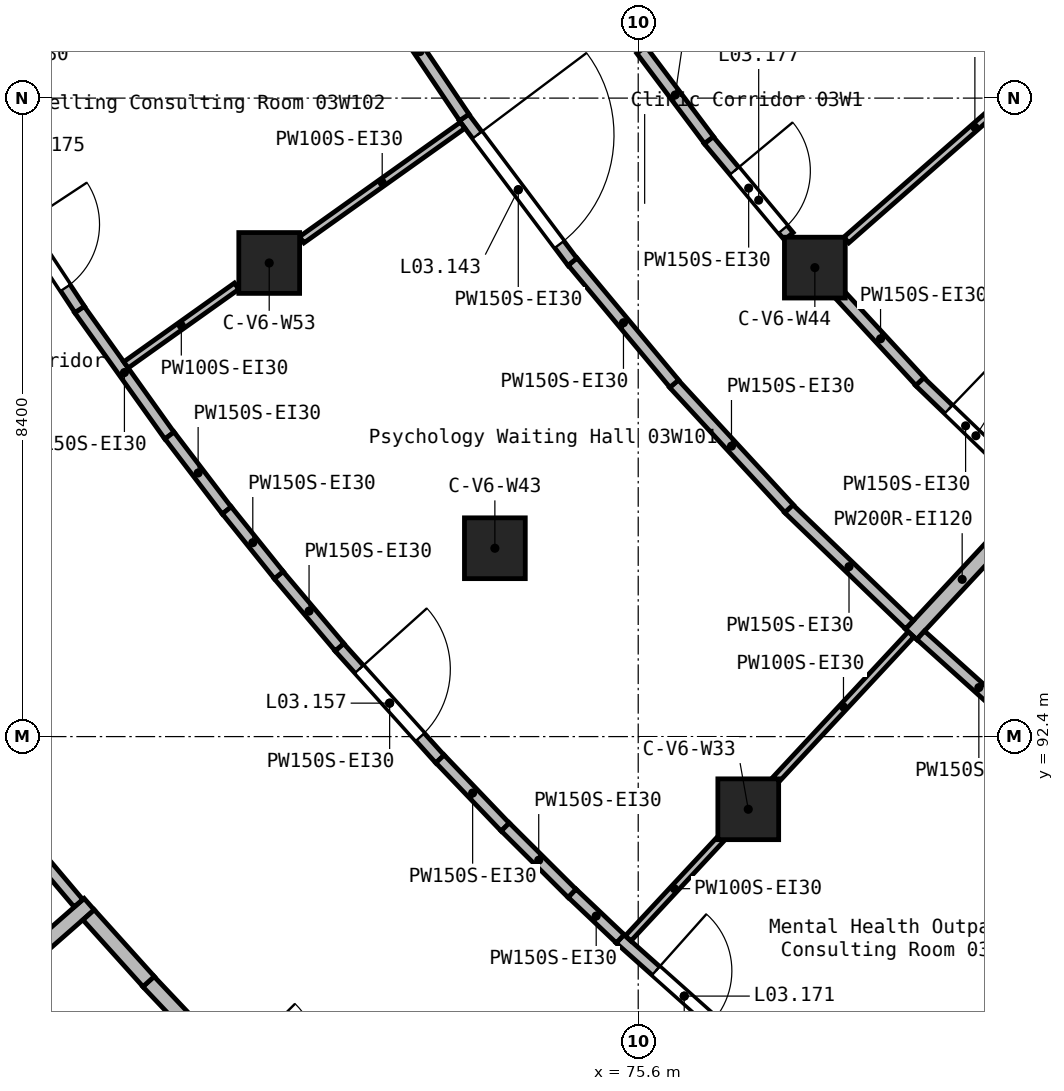
"""IFC4 building model, lengths in metres.
Left out: names, types, materials, properties, quantities, classifications, styles, units other than length and angle.
Written with IfcOpenShell. Run it as: python <this file> out.ifc"""

import sys

from ifc_helpers import new_model, si_unit, direction, frame, frame_2d, origin, origin_2d, place, context, subcontext, project, spatial, rectangle, extrude, element, fill, save


model = new_model("IFC4")
c1 = context("Model", 3, precision=1e-05, world=origin(), true_north=direction((0.0, 1.0)))
c2 = subcontext(c1, "Body", "Model", "MODEL_VIEW")
j1 = project(units=[si_unit("LENGTHUNIT", "METRE"), si_unit("PLANEANGLEUNIT", "RADIAN")], contexts=[c1])
p1 = place(None, origin())
s1 = spatial("IfcSite", under=j1, at=p1, CompositionType="ELEMENT")
p2 = place(p1, origin())
s2 = spatial("IfcBuilding", under=s1, at=p2, CompositionType="ELEMENT")
p3 = place(p2, frame((0.0, 0.0, 16.8)))
s3 = spatial("IfcBuildingStorey", under=s2, at=p3, CompositionType="ELEMENT", Elevation=16.8)
for number, where, z_axis, x_axis in (
    (1, (70.745, 98.631, 0.0), (0.0, 0.0, 1.0), (1.0, 0.0, 0.0)),
    (2, (73.714, 94.878, 0.0), (0.0, 0.0, 1.0), (1.0, 0.0, 0.0)),
    (3, (77.048, 91.444, 0.0), (0.0, 0.0, 1.0), (1.0, 0.0, 0.0)),
    (4, (77.924, 98.57, 0.0), (0.0, 0.0, 1.0), (1.0, 0.0, 0.0)),
):
    element("IfcColumn", number, at=place(p3, frame(where, z_axis=z_axis, x_axis=x_axis)), inside=s3, PredefinedType="COLUMN", context=c2, shape_type="SweptSolid", body=[
        extrude(rectangle(XDim=0.8, YDim=0.8, at=origin_2d()), origin(), (0.0, 0.0, 1.0), 4.2),
    ])
p4 = place(p3, frame((66.869, 88.874, 0.0), z_axis=(0.0, 0.0, 1.0), x_axis=(0.751874567132, 0.659306177205, 0.0)))
e5 = element("IfcWall", 5, at=p4, inside=s3, PredefinedType="SOLIDWALL", context=c2, shape_type="SweptSolid", body=[
    extrude(rectangle(XDim=2.004, YDim=0.2, at=frame_2d((1.002, 0.0))), origin(), (0.0, 0.0, 1.0), 3.9),
])
p5 = place(p3, frame((79.19, 93.746, 0.0), z_axis=(0.0, 0.0, 1.0), x_axis=(0.681171780306, 0.732123627344, 0.0)))
e6 = element("IfcWall", 6, at=p5, inside=s3, PredefinedType="SOLIDWALL", context=c2, shape_type="SweptSolid", body=[
    extrude(rectangle(XDim=1.974, YDim=0.2, at=frame_2d((0.987, 0.0))), origin(), (0.0, 0.0, 1.0), 3.9),
])
p6 = place(p3, frame((69.155, 89.177, 0.0), z_axis=(0.0, 0.0, 1.0), x_axis=(0.687313254989, -0.726361128858, 0.0)))
e7 = element("IfcWall", 7, at=p6, inside=s3, PredefinedType="SOLIDWALL", context=c2, shape_type="SweptSolid", body=[
    extrude(rectangle(XDim=1.382, YDim=0.2, at=frame_2d((0.691, 0.0))), origin(), (0.0, 0.0, 1.0), 3.9),
])
p7 = place(p3, frame((68.369, 90.055, 0.0), z_axis=(0.0, 0.0, 1.0), x_axis=(0.669113274241, -0.74316043102, 0.0)))
e8 = element("IfcWall", 8, at=p7, inside=s3, PredefinedType="SOLIDWALL", context=c2, shape_type="SweptSolid", body=[
    extrude(rectangle(XDim=1.18, YDim=0.2, at=frame_2d((0.59, 0.0))), origin(), (0.0, 0.0, 1.0), 3.9),
])
p8 = place(p3, frame((73.307, 100.547, 0.0), z_axis=(0.0, 0.0, 1.0), x_axis=(0.600377090661, -0.799717043091, 0.0)))
e9 = element("IfcWall", 9, at=p8, inside=s3, PredefinedType="PARTITIONING", context=c2, shape_type="SweptSolid", body=[
    extrude(rectangle(XDim=2.382, YDim=0.15, at=frame_2d((1.191, 0.0))), origin(), (0.0, 0.0, 1.0), 3.9),
])
p9 = place(p8, frame((0.291, 0.0, 0.0)))
e10 = element("IfcOpeningElement", 10, at=p9, cuts=e9, PredefinedType="OPENING", context=c2, shape_type="SweptSolid", body=[
    extrude(rectangle(XDim=1.8, YDim=2.1, at=frame_2d((0.9, 1.05))), frame((0.0, 0.085, 0.0), z_axis=(0.0, -1.0, 0.0), x_axis=(1.0, 0.0, 0.0)), (0.0, 0.0, 1.0), 0.17),
])
p10 = place(p3, frame((77.579, 95.4, 0.0), z_axis=(0.0, 0.0, 1.0), x_axis=(0.720594722174, -0.693356507415, 0.0)))
e11 = element("IfcWall", 11, at=p10, inside=s3, PredefinedType="PARTITIONING", context=c2, shape_type="SweptSolid", body=[
    extrude(rectangle(XDim=2.205, YDim=0.15, at=frame_2d((1.103, 0.0))), origin(), (0.0, 0.0, 1.0), 3.9),
])
p11 = place(p3, frame((76.069, 97.043, 0.0), z_axis=(0.0, 0.0, 1.0), x_axis=(0.678030610295, -0.735033666918, 0.0)))
e12 = element("IfcWall", 12, at=p11, inside=s3, PredefinedType="PARTITIONING", context=c2, shape_type="SweptSolid", body=[
    extrude(rectangle(XDim=2.236, YDim=0.15, at=frame_2d((1.118, 0.0))), origin(), (0.0, 0.0, 1.0), 3.9),
])
p12 = place(p3, frame((79.316, 93.733, 0.0), z_axis=(0.0, 0.0, 1.0), x_axis=(0.74346507851, -0.668774758073, 0.0)))
e13 = element("IfcWall", 13, at=p12, inside=s3, PredefinedType="PARTITIONING", context=c2, shape_type="SweptSolid", body=[
    extrude(rectangle(XDim=2.059, YDim=0.15, at=frame_2d((1.03, 0.0))), origin(), (0.0, 0.0, 1.0), 3.9),
])
p13 = place(p3, frame((72.145, 102.278, 0.0), z_axis=(0.0, 0.0, 1.0), x_axis=(0.558900636953, -0.829234633873, 0.0)))
e14 = element("IfcWall", 14, at=p13, inside=s3, PredefinedType="PARTITIONING", context=c2, shape_type="SweptSolid", body=[
    extrude(rectangle(XDim=2.089, YDim=0.15, at=frame_2d((1.044, 0.0))), origin(), (0.0, 0.0, 1.0), 3.9),
])
p14 = place(p3, frame((74.738, 98.647, 0.0), z_axis=(0.0, 0.0, 1.0), x_axis=(0.640000381719, -0.768374590548, 0.0)))
e15 = element("IfcWall", 15, at=p14, inside=s3, PredefinedType="PARTITIONING", context=c2, shape_type="SweptSolid", body=[
    extrude(rectangle(XDim=2.088, YDim=0.15, at=frame_2d((1.044, 0.0))), origin(), (0.0, 0.0, 1.0), 3.9),
])
p15 = place(p3, frame((75.36, 89.74, 0.0), z_axis=(0.0, 0.0, 1.0), x_axis=(0.746361982095, -0.665540225443, 0.0)))
e16 = element("IfcWall", 16, at=p15, inside=s3, PredefinedType="PARTITIONING", context=c2, shape_type="SweptSolid", body=[
    extrude(rectangle(XDim=2.266, YDim=0.15, at=frame_2d((1.133, 0.0))), origin(), (0.0, 0.0, 1.0), 3.9),
])
p16 = place(p15, frame((0.633, 0.0, 0.0)))
e17 = element("IfcOpeningElement", 17, at=p16, cuts=e16, PredefinedType="OPENING", context=c2, shape_type="SweptSolid", body=[
    extrude(rectangle(XDim=1.0, YDim=2.1, at=frame_2d((0.5, 1.05))), frame((0.0, 0.085, 0.0), z_axis=(0.0, -1.0, 0.0), x_axis=(1.0, 0.0, 0.0)), (0.0, 0.0, 1.0), 0.17),
])
p17 = place(p3, frame((79.301, 97.072, 0.0), z_axis=(0.0, 0.0, 1.0), x_axis=(0.720465115712, -0.69349118022, 0.0)))
e18 = element("IfcWall", 18, at=p17, inside=s3, PredefinedType="PARTITIONING", context=c2, shape_type="SweptSolid", body=[
    extrude(rectangle(XDim=1.684, YDim=0.15, at=frame_2d((0.842, 0.0))), origin(), (0.0, 0.0, 1.0), 3.9),
])
p18 = place(p17, frame((0.53, 0.0, 0.0)))
e19 = element("IfcOpeningElement", 19, at=p18, cuts=e18, PredefinedType="OPENING", context=c2, shape_type="SweptSolid", body=[
    extrude(rectangle(XDim=1.0, YDim=2.1, at=frame_2d((0.5, 1.05))), frame((0.0, 0.085, 0.0), z_axis=(0.0, -1.0, 0.0), x_axis=(1.0, 0.0, 0.0)), (0.0, 0.0, 1.0), 0.17),
])
p19 = place(p3, frame((78.27, 98.195, 0.0), z_axis=(0.0, 0.0, 1.0), x_axis=(0.678273469528, -0.73480956753, 0.0)))
e20 = element("IfcWall", 20, at=p19, inside=s3, PredefinedType="PARTITIONING", context=c2, shape_type="SweptSolid", body=[
    extrude(rectangle(XDim=1.529, YDim=0.15, at=frame_2d((0.764, 0.0))), origin(), (0.0, 0.0, 1.0), 3.9),
])
p20 = place(p3, frame((76.526, 100.249, 0.0), z_axis=(0.0, 0.0, 1.0), x_axis=(0.640038659854, -0.768342706019, 0.0)))
e21 = element("IfcWall", 21, at=p20, inside=s3, PredefinedType="PARTITIONING", context=c2, shape_type="SweptSolid", body=[
    extrude(rectangle(XDim=1.648, YDim=0.15, at=frame_2d((0.824, 0.0))), origin(), (0.0, 0.0, 1.0), 3.9),
])
p21 = place(p20, frame((0.53, 0.0, 0.0)))
e22 = element("IfcOpeningElement", 22, at=p21, cuts=e21, PredefinedType="OPENING", context=c2, shape_type="SweptSolid", body=[
    extrude(rectangle(XDim=1.0, YDim=2.1, at=frame_2d((0.5, 1.05))), frame((0.0, 0.085, 0.0), z_axis=(0.0, -1.0, 0.0), x_axis=(1.0, 0.0, 0.0)), (0.0, 0.0, 1.0), 0.17),
])
p22 = place(p3, frame((75.641, 101.434, 0.0), z_axis=(0.0, 0.0, 1.0), x_axis=(0.60023710435, -0.799822116825, 0.0)))
e23 = element("IfcWall", 23, at=p22, inside=s3, PredefinedType="PARTITIONING", context=c2, shape_type="SweptSolid", body=[
    extrude(rectangle(XDim=1.483, YDim=0.15, at=frame_2d((0.741, 0.0))), origin(), (0.0, 0.0, 1.0), 3.9),
])
p23 = place(p3, frame((67.052, 91.609, 0.0), z_axis=(0.0, 0.0, 1.0), x_axis=(0.645369063346, -0.763870913228, 0.0)))
e24 = element("IfcWall", 24, at=p23, inside=s3, PredefinedType="PARTITIONING", context=c2, shape_type="SweptSolid", body=[
    extrude(rectangle(XDim=1.833, YDim=0.15, at=frame_2d((0.917, 0.0))), origin(), (0.0, 0.0, 1.0), 3.9),
])
p24 = place(p3, frame((68.247, 98.02, 0.0), z_axis=(0.0, 0.0, 1.0), x_axis=(0.580842026392, -0.81401630228, 0.0)))
e25 = element("IfcWall", 25, at=p24, inside=s3, PredefinedType="PARTITIONING", context=c2, shape_type="SweptSolid", body=[
    extrude(rectangle(XDim=2.041, YDim=0.15, at=frame_2d((1.021, 0.0))), origin(), (0.0, 0.0, 1.0), 3.9),
])
p25 = place(p3, frame((71.667, 93.577, 0.0), z_axis=(0.0, 0.0, 1.0), x_axis=(0.668733315137, -0.743502355898, 0.0)))
e26 = element("IfcWall", 26, at=p25, inside=s3, PredefinedType="PARTITIONING", context=c2, shape_type="SweptSolid", body=[
    extrude(rectangle(XDim=1.982, YDim=0.15, at=frame_2d((0.991, 0.0))), origin(), (0.0, 0.0, 1.0), 3.9),
])
p26 = place(p25, frame((0.391, 0.0, 0.0)))
e27 = element("IfcOpeningElement", 27, at=p26, cuts=e26, PredefinedType="OPENING", context=c2, shape_type="SweptSolid", body=[
    extrude(rectangle(XDim=1.2, YDim=2.1, at=frame_2d((0.6, 1.05))), frame((0.0, 0.085, 0.0), z_axis=(0.0, -1.0, 0.0), x_axis=(1.0, 0.0, 0.0)), (0.0, 0.0, 1.0), 0.17),
])
p27 = place(p3, frame((67.244, 99.547, 0.0), z_axis=(0.0, 0.0, 1.0), x_axis=(0.550660027371, -0.834729617454, 0.0)))
e28 = element("IfcWall", 28, at=p27, inside=s3, PredefinedType="PARTITIONING", context=c2, shape_type="SweptSolid", body=[
    extrude(rectangle(XDim=1.83, YDim=0.15, at=frame_2d((0.915, 0.0))), origin(), (0.0, 0.0, 1.0), 3.9),
])
p28 = place(p27, frame((0.489, 0.0, 0.0)))
e29 = element("IfcOpeningElement", 29, at=p28, cuts=e28, PredefinedType="OPENING", context=c2, shape_type="SweptSolid", body=[
    extrude(rectangle(XDim=1.0, YDim=2.1, at=frame_2d((0.5, 1.05))), frame((0.0, 0.085, 0.0), z_axis=(0.0, -1.0, 0.0), x_axis=(1.0, 0.0, 0.0)), (0.0, 0.0, 1.0), 0.17),
])
p29 = place(p3, frame((69.433, 96.362, 0.0), z_axis=(0.0, 0.0, 1.0), x_axis=(0.606457599152, -0.795115828311, 0.0)))
e30 = element("IfcWall", 30, at=p29, inside=s3, PredefinedType="PARTITIONING", context=c2, shape_type="SweptSolid", body=[
    extrude(rectangle(XDim=1.242, YDim=0.15, at=frame_2d((0.621, 0.0))), origin(), (0.0, 0.0, 1.0), 3.9),
])
p30 = place(p3, frame((72.992, 92.106, 0.0), z_axis=(0.0, 0.0, 1.0), x_axis=(0.691209259047, -0.72265466179, 0.0)))
e31 = element("IfcWall", 31, at=p30, inside=s3, PredefinedType="PARTITIONING", context=c2, shape_type="SweptSolid", body=[
    extrude(rectangle(XDim=1.242, YDim=0.15, at=frame_2d((0.621, 0.0))), origin(), (0.0, 0.0, 1.0), 3.9),
])
p31 = place(p3, frame((70.869, 94.525, 0.0), z_axis=(0.0, 0.0, 1.0), x_axis=(0.645236922374, -0.763982535144, 0.0)))
e32 = element("IfcWall", 32, at=p31, inside=s3, PredefinedType="PARTITIONING", context=c2, shape_type="SweptSolid", body=[
    extrude(rectangle(XDim=1.242, YDim=0.15, at=frame_2d((0.621, 0.0))), origin(), (0.0, 0.0, 1.0), 3.9),
])
p32 = place(p3, frame((73.851, 91.211, 0.0), z_axis=(0.0, 0.0, 1.0), x_axis=(0.709168733207, -0.70503879882, 0.0)))
e33 = element("IfcWall", 33, at=p32, inside=s3, PredefinedType="PARTITIONING", context=c2, shape_type="SweptSolid", body=[
    extrude(rectangle(XDim=1.241, YDim=0.15, at=frame_2d((0.621, 0.0))), origin(), (0.0, 0.0, 1.0), 3.9),
])
p33 = place(p3, frame((70.187, 95.377, 0.0), z_axis=(0.0, 0.0, 1.0), x_axis=(0.626301399266, -0.779581013928, 0.0)))
e34 = element("IfcWall", 34, at=p33, inside=s3, PredefinedType="PARTITIONING", context=c2, shape_type="SweptSolid", body=[
    extrude(rectangle(XDim=1.093, YDim=0.15, at=frame_2d((0.546, 0.0))), origin(), (0.0, 0.0, 1.0), 3.9),
])
p34 = place(p3, frame((74.731, 90.339, 0.0), z_axis=(0.0, 0.0, 1.0), x_axis=(0.725923200466, -0.687775767984, 0.0)))
e35 = element("IfcWall", 35, at=p34, inside=s3, PredefinedType="PARTITIONING", context=c2, shape_type="SweptSolid", body=[
    extrude(rectangle(XDim=0.87, YDim=0.15, at=frame_2d((0.435, 0.0))), origin(), (0.0, 0.0, 1.0), 3.9),
])
p35 = place(p3, frame((78.338, 98.933, 0.0), z_axis=(0.0, 0.0, 1.0), x_axis=(0.751823288541, 0.659364650863, 0.0)))
e36 = element("IfcWall", 36, at=p35, inside=s3, PredefinedType="PARTITIONING", context=c2, shape_type="SweptSolid", body=[
    extrude(rectangle(XDim=4.5, YDim=0.1, at=frame_2d((2.25, 0.0))), origin(), (0.0, 0.0, 1.0), 3.9),
])
p36 = place(p3, frame((75.468, 89.746, 0.0), z_axis=(0.0, 0.0, 1.0), x_axis=(0.681143154038, 0.732150260334, 0.0)))
e37 = element("IfcWall", 37, at=p36, inside=s3, PredefinedType="PARTITIONING", context=c2, shape_type="SweptSolid", body=[
    extrude(rectangle(XDim=1.785, YDim=0.1, at=frame_2d((0.893, 0.0))), origin(), (0.0, 0.0, 1.0), 3.9),
])
p37 = place(p3, frame((77.412, 91.835, 0.0), z_axis=(0.0, 0.0, 1.0), x_axis=(0.681147107729, 0.732146582067, 0.0)))
e38 = element("IfcWall", 38, at=p37, inside=s3, PredefinedType="PARTITIONING", context=c2, shape_type="SweptSolid", body=[
    extrude(rectangle(XDim=2.609, YDim=0.1, at=frame_2d((1.304, 0.0))), origin(), (0.0, 0.0, 1.0), 3.9),
])
p38 = place(p3, frame((68.861, 97.29, 0.0), z_axis=(0.0, 0.0, 1.0), x_axis=(0.814701484378, 0.5798805837, 0.0)))
e39 = element("IfcWall", 39, at=p38, inside=s3, PredefinedType="PARTITIONING", context=c2, shape_type="SweptSolid", body=[
    extrude(rectangle(XDim=1.787, YDim=0.1, at=frame_2d((0.894, 0.0))), origin(), (0.0, 0.0, 1.0), 3.9),
])
p39 = place(p3, frame((71.173, 98.936, 0.0), z_axis=(0.0, 0.0, 1.0), x_axis=(0.814672160951, 0.579921779355, 0.0)))
e40 = element("IfcWall", 40, at=p39, inside=s3, PredefinedType="PARTITIONING", context=c2, shape_type="SweptSolid", body=[
    extrude(rectangle(XDim=2.598, YDim=0.1, at=frame_2d((1.299, 0.0))), origin(), (0.0, 0.0, 1.0), 3.9),
])
p40 = place(p9, origin())
e41 = element("IfcDoor", 41, at=p40, inside=s3, OperationType="DOUBLE_DOOR_SINGLE_SWING", PredefinedType="DOOR", context=c2, shape_type="SweptSolid", body=[
    extrude(rectangle(XDim=1.8, YDim=2.1, at=frame_2d((0.9, 1.05))), frame((0.0, 0.025, 0.0), z_axis=(0.0, -1.0, 0.0), x_axis=(1.0, 0.0, 0.0)), (0.0, 0.0, 1.0), 0.05),
])
fill(e10, e41)
p41 = place(p26, frame((1.2, 0.0, 0.0), z_axis=(0.0, 0.0, 1.0), x_axis=(-1.0, 0.0, 0.0)))
e42 = element("IfcDoor", 42, at=p41, inside=s3, OperationType="SINGLE_SWING_RIGHT", PredefinedType="DOOR", context=c2, shape_type="SweptSolid", body=[
    extrude(rectangle(XDim=1.2, YDim=2.1, at=frame_2d((0.6, 1.05))), frame((0.0, 0.025, 0.0), z_axis=(0.0, -1.0, 0.0), x_axis=(1.0, 0.0, 0.0)), (0.0, 0.0, 1.0), 0.05),
])
fill(e27, e42)
p42 = place(p16, origin())
e43 = element("IfcDoor", 43, at=p42, inside=s3, OperationType="SINGLE_SWING_LEFT", PredefinedType="DOOR", context=c2, shape_type="SweptSolid", body=[
    extrude(rectangle(XDim=1.0, YDim=2.1, at=frame_2d((0.5, 1.05))), frame((0.0, 0.025, 0.0), z_axis=(0.0, -1.0, 0.0), x_axis=(1.0, 0.0, 0.0)), (0.0, 0.0, 1.0), 0.05),
])
fill(e17, e43)
p43 = place(p28, origin())
e44 = element("IfcDoor", 44, at=p43, inside=s3, OperationType="SINGLE_SWING_RIGHT", PredefinedType="DOOR", context=c2, shape_type="SweptSolid", body=[
    extrude(rectangle(XDim=1.0, YDim=2.1, at=frame_2d((0.5, 1.05))), frame((0.0, 0.025, 0.0), z_axis=(0.0, -1.0, 0.0), x_axis=(1.0, 0.0, 0.0)), (0.0, 0.0, 1.0), 0.05),
])
fill(e29, e44)
p44 = place(p18, origin())
e45 = element("IfcDoor", 45, at=p44, inside=s3, OperationType="SINGLE_SWING_RIGHT", PredefinedType="DOOR", context=c2, shape_type="SweptSolid", body=[
    extrude(rectangle(XDim=1.0, YDim=2.1, at=frame_2d((0.5, 1.05))), frame((0.0, 0.025, 0.0), z_axis=(0.0, -1.0, 0.0), x_axis=(1.0, 0.0, 0.0)), (0.0, 0.0, 1.0), 0.05),
])
fill(e19, e45)
p45 = place(p21, origin())
e46 = element("IfcDoor", 46, at=p45, inside=s3, OperationType="SINGLE_SWING_RIGHT", PredefinedType="DOOR", context=c2, shape_type="SweptSolid", body=[
    extrude(rectangle(XDim=1.0, YDim=2.1, at=frame_2d((0.5, 1.05))), frame((0.0, 0.025, 0.0), z_axis=(0.0, -1.0, 0.0), x_axis=(1.0, 0.0, 0.0)), (0.0, 0.0, 1.0), 0.05),
])
fill(e22, e46)
save(model, sys.argv[1])
